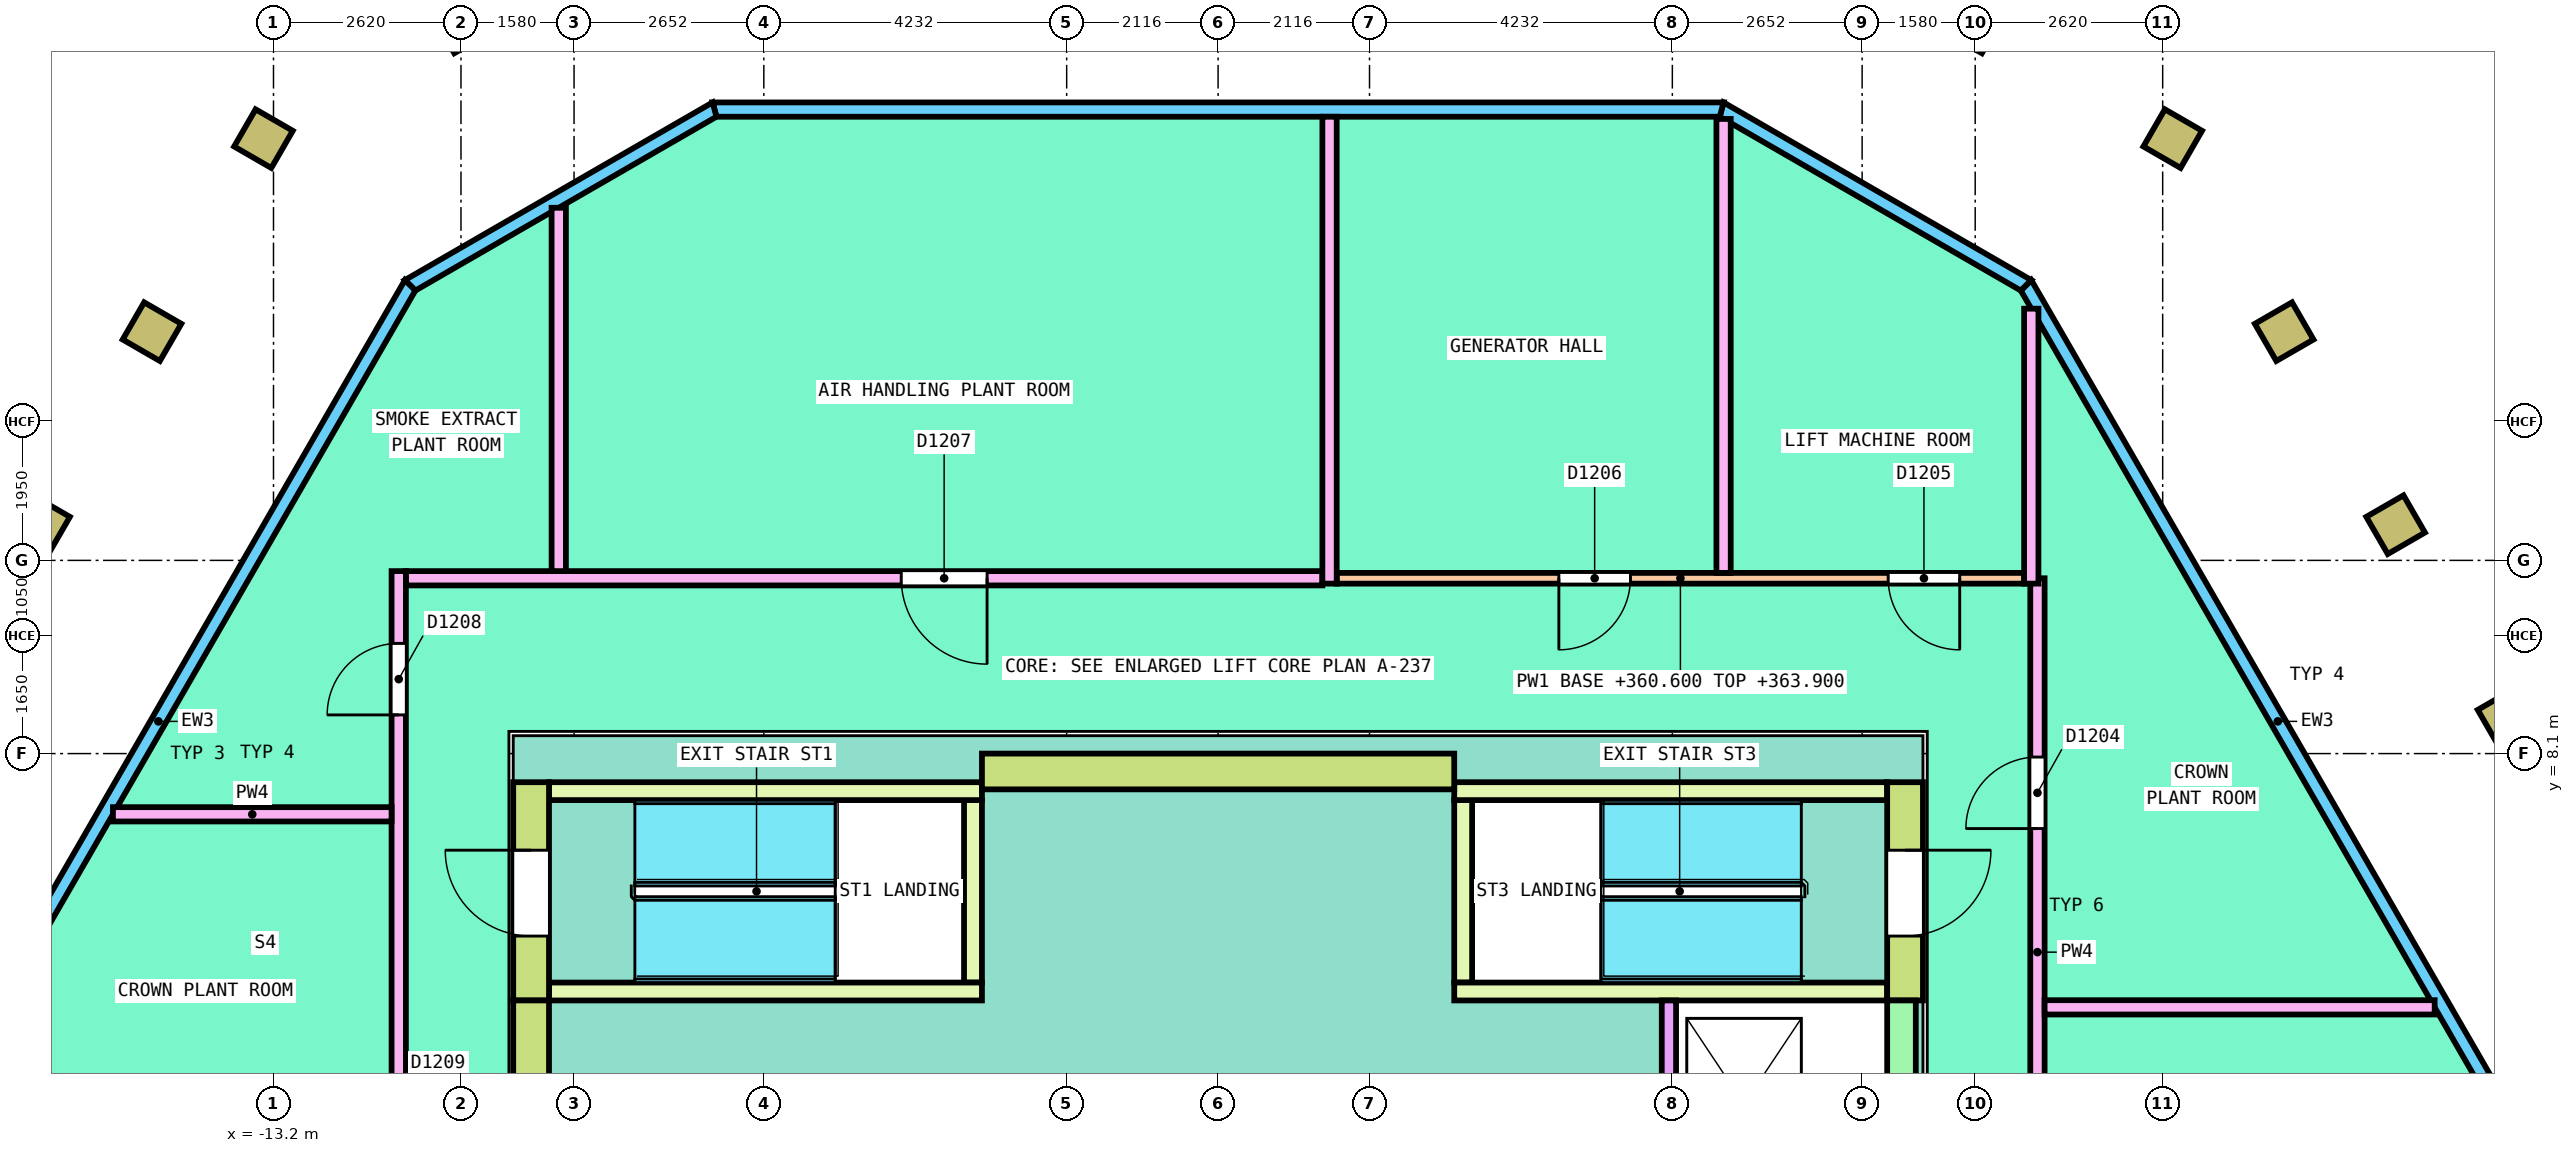
"""IFC4 building model, lengths in metres.
Left out: names, types, materials, properties, quantities, classifications, styles, units other than length and angle.
Written with IfcOpenShell. Run it as: python <this file> out.ifc"""

import sys

from ifc_helpers import new_model, si_unit, direction, frame, frame_2d, origin, origin_2d, place, context, subcontext, project, spatial, polyline, rectangle, hollow_rectangle, outline, extrude, element, fill, save


model = new_model("IFC4")
c1 = context("Model", 3, precision=1e-05, world=origin(), true_north=direction((0.0, 1.0)))
c2 = subcontext(c1, "Body", "Model", "MODEL_VIEW")
j1 = project(units=[si_unit("LENGTHUNIT", "METRE"), si_unit("PLANEANGLEUNIT", "RADIAN")], contexts=[c1])
p1 = place(None, origin())
s1 = spatial("IfcSite", under=j1, at=p1, CompositionType="ELEMENT")
p2 = place(p1, origin())
s2 = spatial("IfcBuilding", under=s1, at=p2, CompositionType="ELEMENT")
p3 = place(p2, frame((0.0, 0.0, 360.6)))
s3 = spatial("IfcBuildingStorey", under=s2, at=p3, CompositionType="ELEMENT", Elevation=360.6)
for number, where, z_axis, x_axis in (
    (1, (18.013, 8.601, 0.0), (0.0, 0.0, 1.0), (-0.5, 0.866, 0.0)),
    (2, (16.455, 11.299, 0.0), (0.0, 0.0, 1.0), (-0.5, 0.866, 0.0)),
    (3, (14.898, 13.996, 0.0), (0.0, 0.0, 1.0), (-0.5, 0.866, 0.0)),
    (4, (13.34, 16.694, 0.0), (0.0, 0.0, 1.0), (-0.866, 0.5, 0.0)),
    (5, (-13.34, 16.694, 0.0), (0.0, 0.0, 1.0), (-0.5, -0.866, 0.0)),
    (6, (-14.898, 13.996, 0.0), (0.0, 0.0, 1.0), (-0.5, -0.866, 0.0)),
    (7, (-16.455, 11.299, 0.0), (0.0, 0.0, 1.0), (-0.5, -0.866, 0.0)),
):
    element("IfcColumn", number, at=place(p3, frame(where, z_axis=z_axis, x_axis=x_axis)), inside=s3, PredefinedType="COLUMN", context=c2, shape_type="SweptSolid", body=[
        extrude(hollow_rectangle(XDim=0.6, YDim=0.6, WallThickness=0.04, InnerFilletRadius=0.04, OuterFilletRadius=0.08, at=origin_2d()), origin(), (0.0, 0.0, 1.0), 4.0),
    ])
p4 = place(p3, frame((18.327, 2.456, 0.0), z_axis=(0.0, 0.0, 1.0), x_axis=(-0.499991740577, 0.866030172312, 0.0)))
e8 = element("IfcWall", 8, at=p4, inside=s3, PredefinedType="SOLIDWALL", context=c2, shape_type="SweptSolid", body=[
    extrude(outline(polyline([(-0.027, -0.1), (14.101, -0.1), (14.047, 0.1), (0.027, 0.1), (-0.027, -0.1)])), origin(), (0.0, 0.0, 1.0), 3.8),
])
p5 = place(p3, frame((11.291, 14.644, 0.0), z_axis=(0.0, 0.0, 1.0), x_axis=(-0.86601671623, 0.500015046984, 0.0)))
e9 = element("IfcWall", 9, at=p5, inside=s3, PredefinedType="SOLIDWALL", context=c2, shape_type="SweptSolid", body=[
    extrude(outline(polyline([(-0.027, -0.1), (4.938, -0.1), (4.885, 0.1), (0.027, 0.1), (-0.027, -0.1)])), origin(), (0.0, 0.0, 1.0), 3.8),
])
p6 = place(p3, frame((7.037, 17.1, 0.0), z_axis=(0.0, 0.0, 1.0), x_axis=(-1.0, 0.0, 0.0)))
e10 = element("IfcWall", 10, at=p6, inside=s3, PredefinedType="SOLIDWALL", context=c2, shape_type="SweptSolid", body=[
    extrude(outline(polyline([(-0.027, -0.1), (14.101, -0.1), (14.047, 0.1), (0.027, 0.1), (-0.027, -0.1)])), origin(), (0.0, 0.0, 1.0), 3.8),
])
p7 = place(p3, frame((-7.037, 17.1, 0.0), z_axis=(0.0, 0.0, 1.0), x_axis=(-0.86601671623, -0.500015046984, 0.0)))
e11 = element("IfcWall", 11, at=p7, inside=s3, PredefinedType="SOLIDWALL", context=c2, shape_type="SweptSolid", body=[
    extrude(outline(polyline([(-0.027, -0.1), (4.938, -0.1), (4.885, 0.1), (0.027, 0.1), (-0.027, -0.1)])), origin(), (0.0, 0.0, 1.0), 3.8),
])
p8 = place(p3, frame((-11.291, 14.644, 0.0), z_axis=(0.0, 0.0, 1.0), x_axis=(-0.499991740577, -0.866030172312, 0.0)))
e12 = element("IfcWall", 12, at=p8, inside=s3, PredefinedType="SOLIDWALL", context=c2, shape_type="SweptSolid", body=[
    extrude(outline(polyline([(-0.027, -0.1), (14.101, -0.1), (14.047, 0.1), (0.027, 0.1), (-0.027, -0.1)])), origin(), (0.0, 0.0, 1.0), 3.8),
])
p9 = place(p3, frame((3.3, 7.85, 0.0), z_axis=(0.0, 0.0, 1.0), x_axis=(-1.0, 0.0, 0.0)))
e13 = element("IfcWall", 13, at=p9, inside=s3, PredefinedType="SHEAR", context=c2, shape_type="SweptSolid", body=[
    extrude(rectangle(XDim=6.6, YDim=0.5, at=frame_2d((3.3, 0.0))), origin(), (0.0, 0.0, 1.0), 3.8),
])
p10 = place(p3, frame((-9.6, 4.65, 0.0), z_axis=(0.0, 0.0, 1.0), x_axis=(0.0, -1.0, 0.0)))
e14 = element("IfcWall", 14, at=p10, inside=s3, PredefinedType="SHEAR", context=c2, shape_type="SweptSolid", body=[
    extrude(outline(polyline([(0.0, 0.0), (12.136, 0.0), (12.137, 0.477), (9.18, 3.8), (5.18, 3.8), (0.0, 3.8), (0.0, 0.0)])), frame((0.0, 0.25, 0.0), z_axis=(0.0, -1.0, 0.0), x_axis=(1.0, 0.0, 0.0)), (0.0, 0.0, 1.0), 0.5),
])
p11 = place(p10, frame((5.437, 0.0, 0.0)))
e15 = element("IfcOpeningElement", 15, at=p11, cuts=e14, PredefinedType="OPENING", context=c2, shape_type="SweptSolid", body=[
    extrude(rectangle(XDim=1.2, YDim=2.1, at=frame_2d((0.6, 1.05))), frame((0.0, 0.26, 0.0), z_axis=(0.0, -1.0, 0.0), x_axis=(1.0, 0.0, 0.0)), (0.0, 0.0, 1.0), 0.52),
])
p12 = place(p3, frame((-9.6, 4.65, 0.0), z_axis=(0.0, 0.0, 1.0), x_axis=(0.0, 1.0, 0.0)))
e16 = element("IfcWall", 16, at=p12, inside=s3, PredefinedType="SHEAR", context=c2, shape_type="SweptSolid", body=[
    extrude(rectangle(XDim=3.05, YDim=0.5, at=frame_2d((1.525, 0.0))), origin(), (0.0, 0.0, 1.0), 3.8),
])
p13 = place(p12, frame((0.9, 0.0, 0.0)))
e17 = element("IfcOpeningElement", 17, at=p13, cuts=e16, PredefinedType="OPENING", context=c2, shape_type="SweptSolid", body=[
    extrude(rectangle(XDim=1.2, YDim=2.1, at=frame_2d((0.6, 1.05))), frame((0.0, 0.26, 0.0), z_axis=(0.0, -1.0, 0.0), x_axis=(1.0, 0.0, 0.0)), (0.0, 0.0, 1.0), 0.52),
])
p14 = place(p3, frame((-3.425, 4.9, 0.0), z_axis=(0.0, 0.0, 1.0), x_axis=(0.0, 1.0, 0.0)))
e18 = element("IfcWall", 18, at=p14, inside=s3, PredefinedType="SOLIDWALL", context=c2, shape_type="SweptSolid", body=[
    extrude(rectangle(XDim=2.55, YDim=0.25, at=frame_2d((1.275, 0.0))), origin(), (0.0, 0.0, 1.0), 3.8),
])
for number, where, z_axis, x_axis in (
    (19, (-9.35, 4.775, 0.0), (0.0, 0.0, 1.0), (1.0, 0.0, 0.0)),
    (20, (-9.35, 7.575, 0.0), (0.0, 0.0, 1.0), (1.0, 0.0, 0.0)),
):
    element("IfcWall", number, at=place(p3, frame(where, z_axis=z_axis, x_axis=x_axis)), inside=s3, PredefinedType="SOLIDWALL", context=c2, shape_type="SweptSolid", body=[
        extrude(rectangle(XDim=6.05, YDim=0.25, at=frame_2d((3.025, 0.0))), origin(), (0.0, 0.0, 1.0), 3.8),
    ])
p15 = place(p3, frame((9.6, 4.65, 0.0), z_axis=(0.0, 0.0, 1.0), x_axis=(0.0, 1.0, 0.0)))
e21 = element("IfcWall", 21, at=p15, inside=s3, PredefinedType="SHEAR", context=c2, shape_type="SweptSolid", body=[
    extrude(rectangle(XDim=3.05, YDim=0.5, at=frame_2d((1.525, 0.0))), origin(), (0.0, 0.0, 1.0), 3.8),
])
p16 = place(p15, frame((0.9, 0.0, 0.0)))
e22 = element("IfcOpeningElement", 22, at=p16, cuts=e21, PredefinedType="OPENING", context=c2, shape_type="SweptSolid", body=[
    extrude(rectangle(XDim=1.2, YDim=2.1, at=frame_2d((0.6, 1.05))), frame((0.0, 0.26, 0.0), z_axis=(0.0, -1.0, 0.0), x_axis=(1.0, 0.0, 0.0)), (0.0, 0.0, 1.0), 0.52),
])
p17 = place(p3, frame((3.425, 4.9, 0.0), z_axis=(0.0, 0.0, 1.0), x_axis=(0.0, 1.0, 0.0)))
e23 = element("IfcWall", 23, at=p17, inside=s3, PredefinedType="SOLIDWALL", context=c2, shape_type="SweptSolid", body=[
    extrude(rectangle(XDim=2.55, YDim=0.25, at=frame_2d((1.275, 0.0))), origin(), (0.0, 0.0, 1.0), 3.8),
])
for number, where, z_axis, x_axis in (
    (24, (3.3, 4.775, 0.0), (0.0, 0.0, 1.0), (1.0, 0.0, 0.0)),
    (25, (3.3, 7.575, 0.0), (0.0, 0.0, 1.0), (1.0, 0.0, 0.0)),
):
    element("IfcWall", number, at=place(p3, frame(where, z_axis=z_axis, x_axis=x_axis)), inside=s3, PredefinedType="SOLIDWALL", context=c2, shape_type="SweptSolid", body=[
        extrude(rectangle(XDim=6.05, YDim=0.25, at=frame_2d((3.025, 0.0))), origin(), (0.0, 0.0, 1.0), 3.8),
    ])
p18 = place(p3, frame((6.3, 1.75, 0.0), z_axis=(0.0, 0.0, 1.0), x_axis=(0.0, 1.0, 0.0)))
e26 = element("IfcWall", 26, at=p18, inside=s3, PredefinedType="SOLIDWALL", context=c2, shape_type="SweptSolid", body=[
    extrude(rectangle(XDim=2.9, YDim=0.2, at=frame_2d((1.45, 0.0))), origin(), (0.0, 0.0, 1.0), 3.8),
])
p19 = place(p3, frame((9.55, 1.5, 0.0), z_axis=(0.0, 0.0, 1.0), x_axis=(0.0, 1.0, 0.0)))
e27 = element("IfcWall", 27, at=p19, inside=s3, PredefinedType="SHEAR", context=c2, shape_type="SweptSolid", body=[
    extrude(rectangle(XDim=3.15, YDim=0.4, at=frame_2d((1.575, 0.0))), origin(), (0.0, 0.0, 1.0), 3.8),
])
p20 = place(p3, frame((1.657, 10.55, 0.0), z_axis=(0.0, 0.0, 1.0), x_axis=(1.0, 0.0, 0.0)))
e28 = element("IfcWall", 28, at=p20, inside=s3, PredefinedType="PARTITIONING", context=c2, shape_type="SweptSolid", body=[
    extrude(rectangle(XDim=9.606, YDim=0.15, at=frame_2d((4.803, 0.0))), origin(), (0.0, 0.0, 1.0), 3.3),
])
p21 = place(p20, frame((7.706, 0.0, 0.0)))
e29 = element("IfcOpeningElement", 29, at=p21, cuts=e28, PredefinedType="OPENING", context=c2, shape_type="SweptSolid", body=[
    extrude(rectangle(XDim=1.0, YDim=2.1, at=frame_2d((0.5, 1.05))), frame((0.0, 0.085, 0.0), z_axis=(0.0, -1.0, 0.0), x_axis=(1.0, 0.0, 0.0)), (0.0, 0.0, 1.0), 0.17),
])
p22 = place(p20, frame((3.105, 0.0, 0.0)))
e30 = element("IfcOpeningElement", 30, at=p22, cuts=e28, PredefinedType="OPENING", context=c2, shape_type="SweptSolid", body=[
    extrude(rectangle(XDim=1.0, YDim=2.1, at=frame_2d((0.5, 1.05))), frame((0.0, 0.085, 0.0), z_axis=(0.0, -1.0, 0.0), x_axis=(1.0, 0.0, 0.0)), (0.0, 0.0, 1.0), 0.17),
])
p23 = place(p3, frame((11.45, 0.1, 0.0), z_axis=(0.0, 0.0, 1.0), x_axis=(0.0, 1.0, 0.0)))
e31 = element("IfcWall", 31, at=p23, inside=s3, PredefinedType="PARTITIONING", context=c2, shape_type="SweptSolid", body=[
    extrude(rectangle(XDim=10.45, YDim=0.2, at=frame_2d((5.225, 0.0))), origin(), (0.0, 0.0, 1.0), 3.3),
])
p24 = place(p23, frame((0.963, 0.0, 0.0)))
e32 = element("IfcOpeningElement", 32, at=p24, cuts=e31, PredefinedType="OPENING", context=c2, shape_type="SweptSolid", body=[
    extrude(rectangle(XDim=1.0, YDim=2.1, at=frame_2d((0.5, 1.05))), frame((0.0, 0.11, 0.0), z_axis=(0.0, -1.0, 0.0), x_axis=(1.0, 0.0, 0.0)), (0.0, 0.0, 1.0), 0.22),
])
p25 = place(p23, frame((6.952, 0.0, 0.0)))
e33 = element("IfcOpeningElement", 33, at=p25, cuts=e31, PredefinedType="OPENING", context=c2, shape_type="SweptSolid", body=[
    extrude(rectangle(XDim=1.0, YDim=2.1, at=frame_2d((0.5, 1.05))), frame((0.0, 0.11, 0.0), z_axis=(0.0, -1.0, 0.0), x_axis=(1.0, 0.0, 0.0)), (0.0, 0.0, 1.0), 0.22),
])
p26 = place(p3, frame((-11.35, 10.55, 0.0), z_axis=(0.0, 0.0, 1.0), x_axis=(1.0, 0.0, 0.0)))
e34 = element("IfcWall", 34, at=p26, inside=s3, PredefinedType="PARTITIONING", context=c2, shape_type="SweptSolid", body=[
    extrude(rectangle(XDim=12.808, YDim=0.2, at=frame_2d((6.404, 0.0))), origin(), (0.0, 0.0, 1.0), 3.3),
])
p27 = place(p26, frame((6.922, 0.0, 0.0)))
e35 = element("IfcOpeningElement", 35, at=p27, cuts=e34, PredefinedType="OPENING", context=c2, shape_type="SweptSolid", body=[
    extrude(rectangle(XDim=1.2, YDim=2.1, at=frame_2d((0.6, 1.05))), frame((0.0, 0.11, 0.0), z_axis=(0.0, -1.0, 0.0), x_axis=(1.0, 0.0, 0.0)), (0.0, 0.0, 1.0), 0.22),
])
p28 = place(p3, frame((-11.45, -4.33, 0.0), z_axis=(0.0, 0.0, 1.0), x_axis=(0.0, 1.0, 0.0)))
e36 = element("IfcWall", 36, at=p28, inside=s3, PredefinedType="PARTITIONING", context=c2, shape_type="SweptSolid", body=[
    extrude(rectangle(XDim=14.98, YDim=0.2, at=frame_2d((7.49, 0.0))), origin(), (0.0, 0.0, 1.0), 3.2),
])
p29 = place(p28, frame((12.971, 0.0, 0.0)))
e37 = element("IfcOpeningElement", 37, at=p29, cuts=e36, PredefinedType="OPENING", context=c2, shape_type="SweptSolid", body=[
    extrude(rectangle(XDim=1.0, YDim=2.1, at=frame_2d((0.5, 1.05))), frame((0.0, 0.11, 0.0), z_axis=(0.0, -1.0, 0.0), x_axis=(1.0, 0.0, 0.0)), (0.0, 0.0, 1.0), 0.22),
])
p30 = place(p28, frame((6.553, 0.0, 0.0)))
e38 = element("IfcOpeningElement", 38, at=p30, cuts=e36, PredefinedType="OPENING", context=c2, shape_type="SweptSolid", body=[
    extrude(rectangle(XDim=1.2, YDim=2.1, at=frame_2d((0.6, 1.05))), frame((0.0, 0.11, 0.0), z_axis=(0.0, -1.0, 0.0), x_axis=(1.0, 0.0, 0.0)), (0.0, 0.0, 1.0), 0.22),
])
p31 = place(p28, frame((1.271, 0.0, 0.0)))
e39 = element("IfcOpeningElement", 39, at=p31, cuts=e36, PredefinedType="OPENING", context=c2, shape_type="SweptSolid", body=[
    extrude(rectangle(XDim=1.0, YDim=2.1, at=frame_2d((0.5, 1.05))), frame((0.0, 0.11, 0.0), z_axis=(0.0, -1.0, 0.0), x_axis=(1.0, 0.0, 0.0)), (0.0, 0.0, 1.0), 0.22),
])
p32 = place(p3, frame((11.55, 4.554, 0.0), z_axis=(0.0, 0.0, 1.0), x_axis=(1.0, 0.0, 0.0)))
e40 = element("IfcWall", 40, at=p32, inside=s3, PredefinedType="PARTITIONING", context=c2, shape_type="SweptSolid", body=[
    extrude(rectangle(XDim=5.451, YDim=0.2, at=frame_2d((2.726, 0.0))), origin(), (0.0, 0.0, 1.0), 3.3),
])
p33 = place(p3, frame((11.364, 10.475, 0.0), z_axis=(0.0, 0.0, 1.0), x_axis=(0.0, 1.0, 0.0)))
e41 = element("IfcWall", 41, at=p33, inside=s3, PredefinedType="PARTITIONING", context=c2, shape_type="SweptSolid", body=[
    extrude(rectangle(XDim=3.842, YDim=0.2, at=frame_2d((1.921, 0.0))), origin(), (0.0, 0.0, 1.0), 3.3),
])
p34 = place(p3, frame((7.064, 10.625, 0.0), z_axis=(0.0, 0.0, 1.0), x_axis=(0.0, 1.0, 0.0)))
e42 = element("IfcWall", 42, at=p34, inside=s3, PredefinedType="PARTITIONING", context=c2, shape_type="SweptSolid", body=[
    extrude(rectangle(XDim=6.344, YDim=0.2, at=frame_2d((3.172, 0.0))), origin(), (0.0, 0.0, 1.0), 3.3),
])
p35 = place(p3, frame((1.557, 10.475, 0.0), z_axis=(0.0, 0.0, 1.0), x_axis=(0.0, 1.0, 0.0)))
e43 = element("IfcWall", 43, at=p35, inside=s3, PredefinedType="PARTITIONING", context=c2, shape_type="SweptSolid", body=[
    extrude(rectangle(XDim=6.525, YDim=0.2, at=frame_2d((3.262, 0.0))), origin(), (0.0, 0.0, 1.0), 3.3),
])
p36 = place(p3, frame((-9.214, 10.65, 0.0), z_axis=(0.0, 0.0, 1.0), x_axis=(0.0, 1.0, 0.0)))
e44 = element("IfcWall", 44, at=p36, inside=s3, PredefinedType="PARTITIONING", context=c2, shape_type="SweptSolid", body=[
    extrude(rectangle(XDim=5.078, YDim=0.2, at=frame_2d((2.539, 0.0))), origin(), (0.0, 0.0, 1.0), 3.3),
])
p37 = place(p3, frame((-15.443, 7.251, 0.0), z_axis=(0.0, 0.0, 1.0), x_axis=(1.0, 0.0, 0.0)))
e45 = element("IfcWall", 45, at=p37, inside=s3, PredefinedType="PARTITIONING", context=c2, shape_type="SweptSolid", body=[
    extrude(rectangle(XDim=3.893, YDim=0.2, at=frame_2d((1.947, 0.0))), origin(), (0.0, 0.0, 1.0), 3.3),
])
p38 = place(p13, origin())
e46 = element("IfcDoor", 46, at=p38, inside=s3, OperationType="SINGLE_SWING_LEFT", PredefinedType="DOOR", context=c2, shape_type="SweptSolid", body=[
    extrude(rectangle(XDim=1.2, YDim=2.1, at=frame_2d((0.6, 1.05))), frame((0.0, 0.2, 0.0), z_axis=(0.0, -1.0, 0.0), x_axis=(1.0, 0.0, 0.0)), (0.0, 0.0, 1.0), 0.4),
])
fill(e17, e46)
p39 = place(p16, origin())
e47 = element("IfcDoor", 47, at=p39, inside=s3, OperationType="SINGLE_SWING_RIGHT", PredefinedType="DOOR", context=c2, shape_type="SweptSolid", body=[
    extrude(rectangle(XDim=1.2, YDim=2.1, at=frame_2d((0.6, 1.05))), frame((0.0, 0.2, 0.0), z_axis=(0.0, -1.0, 0.0), x_axis=(1.0, 0.0, 0.0)), (0.0, 0.0, 1.0), 0.4),
])
fill(e22, e47)
p40 = place(p25, origin())
e48 = element("IfcDoor", 48, at=p40, inside=s3, OperationType="SINGLE_SWING_RIGHT", PredefinedType="DOOR", context=c2, shape_type="SweptSolid", body=[
    extrude(rectangle(XDim=1.0, YDim=2.1, at=frame_2d((0.5, 1.05))), frame((0.0, 0.025, 0.0), z_axis=(0.0, -1.0, 0.0), x_axis=(1.0, 0.0, 0.0)), (0.0, 0.0, 1.0), 0.05),
])
fill(e33, e48)
p41 = place(p21, origin())
e49 = element("IfcDoor", 49, at=p41, inside=s3, OperationType="SINGLE_SWING_RIGHT", PredefinedType="DOOR", context=c2, shape_type="SweptSolid", body=[
    extrude(rectangle(XDim=1.0, YDim=2.1, at=frame_2d((0.5, 1.05))), frame((0.0, 0.025, 0.0), z_axis=(0.0, -1.0, 0.0), x_axis=(1.0, 0.0, 0.0)), (0.0, 0.0, 1.0), 0.05),
])
fill(e29, e49)
p42 = place(p22, origin())
e50 = element("IfcDoor", 50, at=p42, inside=s3, OperationType="SINGLE_SWING_LEFT", PredefinedType="DOOR", context=c2, shape_type="SweptSolid", body=[
    extrude(rectangle(XDim=1.0, YDim=2.1, at=frame_2d((0.5, 1.05))), frame((0.0, 0.025, 0.0), z_axis=(0.0, -1.0, 0.0), x_axis=(1.0, 0.0, 0.0)), (0.0, 0.0, 1.0), 0.05),
])
fill(e30, e50)
p43 = place(p27, origin())
e51 = element("IfcDoor", 51, at=p43, inside=s3, OperationType="DOUBLE_DOOR_SINGLE_SWING", PredefinedType="DOOR", context=c2, shape_type="SweptSolid", body=[
    extrude(rectangle(XDim=1.2, YDim=2.1, at=frame_2d((0.6, 1.05))), frame((0.0, 0.025, 0.0), z_axis=(0.0, -1.0, 0.0), x_axis=(1.0, 0.0, 0.0)), (0.0, 0.0, 1.0), 0.05),
])
fill(e35, e51)
p44 = place(p29, origin())
e52 = element("IfcDoor", 52, at=p44, inside=s3, OperationType="SINGLE_SWING_LEFT", PredefinedType="DOOR", context=c2, shape_type="SweptSolid", body=[
    extrude(rectangle(XDim=1.0, YDim=2.1, at=frame_2d((0.5, 1.05))), frame((0.0, 0.025, 0.0), z_axis=(0.0, -1.0, 0.0), x_axis=(1.0, 0.0, 0.0)), (0.0, 0.0, 1.0), 0.05),
])
fill(e37, e52)
save(model, sys.argv[1])
